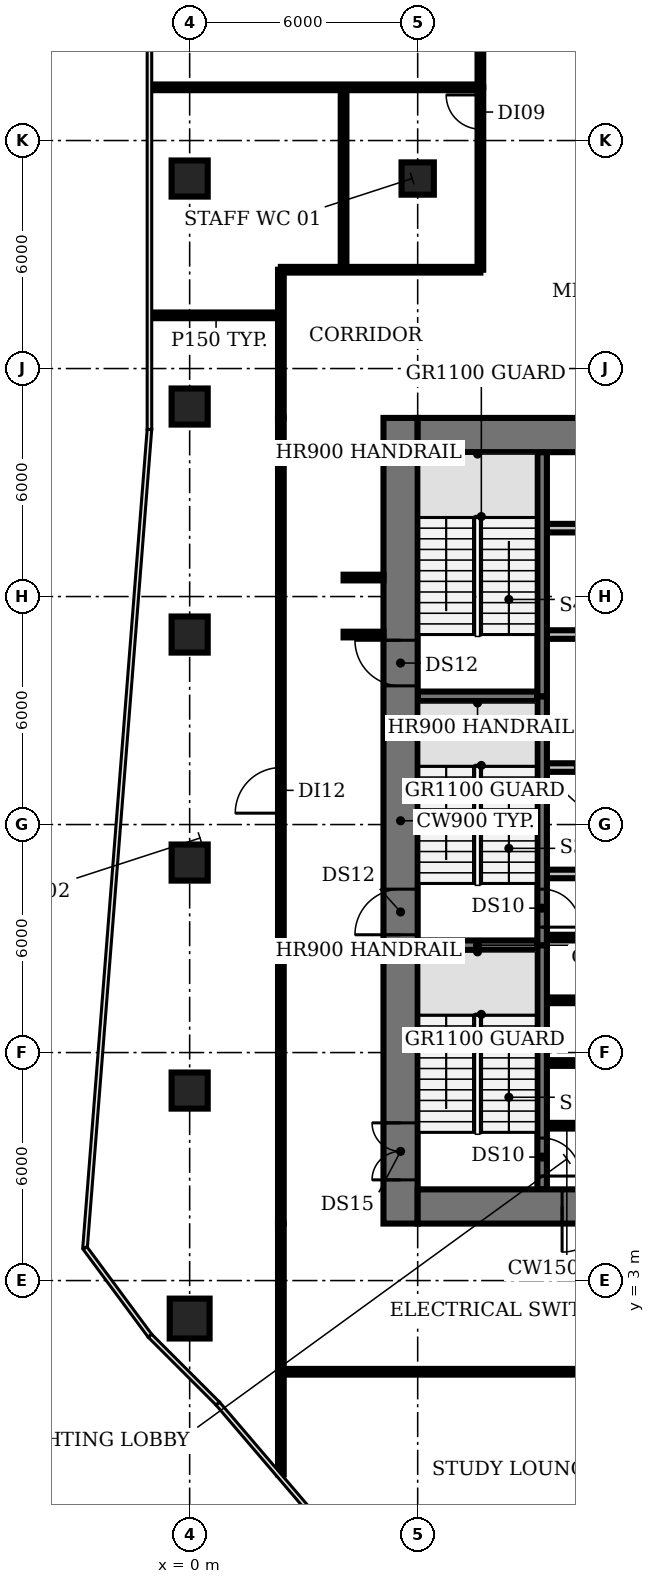
"""IFC4 building model, lengths in metres.
Left out: names, types, materials, properties, quantities, classifications, styles, units other than length and angle.
Written with IfcOpenShell. Run it as: python <this file> out.ifc"""

import sys

from ifc_helpers import new_model, si_unit, direction, frame, frame_2d, origin, origin_2d, place, context, subcontext, project, spatial, rectangle, circle, extrude, element, fill, save


model = new_model("IFC4")
c1 = context("Model", 3, precision=1e-05, world=origin(), true_north=direction((0.0, 1.0)))
c2 = subcontext(c1, "Body", "Model", "MODEL_VIEW")
j1 = project(units=[si_unit("LENGTHUNIT", "METRE"), si_unit("PLANEANGLEUNIT", "RADIAN")], contexts=[c1])
p1 = place(None, origin())
s1 = spatial("IfcSite", under=j1, at=p1, CompositionType="ELEMENT")
p2 = place(p1, origin())
s2 = spatial("IfcBuilding", under=s1, at=p2, CompositionType="ELEMENT")
p3 = place(p2, frame((0.0, 0.0, 33.2)))
s3 = spatial("IfcBuildingStorey", under=s2, at=p3, CompositionType="ELEMENT", Elevation=33.2)
p4 = place(p3, frame((0.0, 2.0, 0.0), z_axis=(0.0, 0.0, 1.0), x_axis=(1.0, 0.0, 0.0)))
e1 = element("IfcColumn", 1, at=p4, inside=s3, PredefinedType="COLUMN", context=c2, shape_type="SweptSolid", body=[
    extrude(circle(Radius=0.525, at=origin_2d()), origin(), (0.0, 0.0, 1.0), 3.85),
])
for number, where, z_axis, x_axis in (
    (2, (0.0, 8.0, 0.0), (0.0, 0.0, 1.0), (1.0, 0.0, 0.0)),
    (3, (0.0, 14.0, 0.0), (0.0, 0.0, 1.0), (1.0, 0.0, 0.0)),
    (4, (0.0, 20.0, 0.0), (0.0, 0.0, 1.0), (1.0, 0.0, 0.0)),
    (5, (0.0, 26.0, 0.0), (0.0, 0.0, 1.0), (1.0, 0.0, 0.0)),
    (6, (0.0, 32.0, 0.0), (0.0, 0.0, 1.0), (1.0, 0.0, 0.0)),
):
    element("IfcColumn", number, at=place(p3, frame(where, z_axis=z_axis, x_axis=x_axis)), inside=s3, PredefinedType="COLUMN", context=c2, shape_type="SweptSolid", body=[
        extrude(rectangle(XDim=0.95, YDim=0.95, at=origin_2d()), origin(), (0.0, 0.0, 1.0), 3.85),
    ])
p5 = place(p3, frame((6.0, 32.0, 0.0), z_axis=(0.0, 0.0, 1.0), x_axis=(1.0, 0.0, 0.0)))
e7 = element("IfcColumn", 7, at=p5, inside=s3, PredefinedType="COLUMN", context=c2, shape_type="SweptSolid", body=[
    extrude(rectangle(XDim=0.85, YDim=0.85, at=origin_2d()), origin(), (0.0, 0.0, 1.0), 3.85),
])
for number, where, z_axis, x_axis in (
    (8, (9.4, 7.075, 0.0), (0.0, 0.0, 1.0), (1.0, 0.0, 0.0)),
    (9, (9.4, 8.725, 0.0), (0.0, 0.0, 1.0), (1.0, 0.0, 0.0)),
    (10, (9.4, 10.375, 0.0), (0.0, 0.0, 1.0), (1.0, 0.0, 0.0)),
):
    element("IfcWall", number, at=place(p3, frame(where, z_axis=z_axis, x_axis=x_axis)), inside=s3, PredefinedType="SHEAR", context=c2, shape_type="SweptSolid", body=[
        extrude(rectangle(XDim=1.05, YDim=0.15, at=frame_2d((0.525, 0.0))), origin(), (0.0, 0.0, 1.0), 3.85),
    ])
p6 = place(p3, frame((6.0, 11.825, 0.0), z_axis=(0.0, 0.0, 1.0), x_axis=(1.0, 0.0, 0.0)))
e11 = element("IfcWall", 11, at=p6, inside=s3, PredefinedType="SHEAR", context=c2, shape_type="SweptSolid", body=[
    extrude(rectangle(XDim=3.15, YDim=0.25, at=frame_2d((1.575, 0.0))), origin(), (0.0, 0.0, 1.0), 3.85),
])
p7 = place(p3, frame((9.4, 12.025, 0.0), z_axis=(0.0, 0.0, 1.0), x_axis=(1.0, 0.0, 0.0)))
e12 = element("IfcWall", 12, at=p7, inside=s3, PredefinedType="SHEAR", context=c2, shape_type="SweptSolid", body=[
    extrude(rectangle(XDim=1.05, YDim=0.15, at=frame_2d((0.525, 0.0))), origin(), (0.0, 0.0, 1.0), 3.85),
])
p8 = place(p3, frame((9.4, 13.7, 0.0), z_axis=(0.0, 0.0, 1.0), x_axis=(1.0, 0.0, 0.0)))
e13 = element("IfcWall", 13, at=p8, inside=s3, PredefinedType="PARTITIONING", context=c2, shape_type="SweptSolid", body=[
    extrude(rectangle(XDim=4.0, YDim=0.225, at=frame_2d((2.0, 0.0))), origin(), (0.0, 0.0, 1.0), 3.85),
])
p9 = place(p3, frame((9.4, 16.5, 0.0), z_axis=(0.0, 0.0, 1.0), x_axis=(1.0, 0.0, 0.0)))
e14 = element("IfcWall", 14, at=p9, inside=s3, PredefinedType="PARTITIONING", context=c2, shape_type="SweptSolid", body=[
    extrude(rectangle(XDim=14.6, YDim=0.225, at=frame_2d((7.3, 0.0))), origin(), (0.0, 0.0, 1.0), 3.85),
])
p10 = place(p9, frame((0.75, 0.0, 0.0)))
e15 = element("IfcOpeningElement", 15, at=p10, cuts=e14, PredefinedType="OPENING", context=c2, shape_type="SweptSolid", body=[
    extrude(rectangle(XDim=1.1, YDim=2.1, at=frame_2d((0.55, 1.05))), frame((0.0, 0.123, 0.0), z_axis=(0.0, -1.0, 0.0), x_axis=(1.0, 0.0, 0.0)), (0.0, 0.0, 1.0), 0.245),
])
p11 = place(p9, frame((3.55, 0.0, 0.0)))
e16 = element("IfcOpeningElement", 16, at=p11, cuts=e14, PredefinedType="OPENING", context=c2, shape_type="SweptSolid", body=[
    extrude(rectangle(XDim=1.1, YDim=2.1, at=frame_2d((0.55, 1.05))), frame((0.0, 0.123, 0.0), z_axis=(0.0, -1.0, 0.0), x_axis=(1.0, 0.0, 0.0)), (0.0, 0.0, 1.0), 0.245),
])
p12 = place(p9, frame((6.35, 0.0, 0.0)))
e17 = element("IfcOpeningElement", 17, at=p12, cuts=e14, PredefinedType="OPENING", context=c2, shape_type="SweptSolid", body=[
    extrude(rectangle(XDim=1.1, YDim=2.1, at=frame_2d((0.55, 1.05))), frame((0.0, 0.123, 0.0), z_axis=(0.0, -1.0, 0.0), x_axis=(1.0, 0.0, 0.0)), (0.0, 0.0, 1.0), 0.245),
])
p13 = place(p9, frame((9.15, 0.0, 0.0)))
e18 = element("IfcOpeningElement", 18, at=p13, cuts=e14, PredefinedType="OPENING", context=c2, shape_type="SweptSolid", body=[
    extrude(rectangle(XDim=1.1, YDim=2.1, at=frame_2d((0.55, 1.05))), frame((0.0, 0.123, 0.0), z_axis=(0.0, -1.0, 0.0), x_axis=(1.0, 0.0, 0.0)), (0.0, 0.0, 1.0), 0.245),
])
p14 = place(p9, frame((11.308, 0.0, 0.0)))
e19 = element("IfcOpeningElement", 19, at=p14, cuts=e14, PredefinedType="OPENING", context=c2, shape_type="SweptSolid", body=[
    extrude(rectangle(XDim=0.9, YDim=2.1, at=frame_2d((0.45, 1.05))), frame((0.0, 0.123, 0.0), z_axis=(0.0, -1.0, 0.0), x_axis=(1.0, 0.0, 0.0)), (0.0, 0.0, 1.0), 0.245),
])
p15 = place(p9, frame((13.083, 0.0, 0.0)))
e20 = element("IfcOpeningElement", 20, at=p15, cuts=e14, PredefinedType="OPENING", context=c2, shape_type="SweptSolid", body=[
    extrude(rectangle(XDim=0.9, YDim=2.1, at=frame_2d((0.45, 1.05))), frame((0.0, 0.123, 0.0), z_axis=(0.0, -1.0, 0.0), x_axis=(1.0, 0.0, 0.0)), (0.0, 0.0, 1.0), 0.245),
])
p16 = place(p3, frame((6.0, 18.375, 0.0), z_axis=(0.0, 0.0, 1.0), x_axis=(1.0, 0.0, 0.0)))
e21 = element("IfcWall", 21, at=p16, inside=s3, PredefinedType="SHEAR", context=c2, shape_type="SweptSolid", body=[
    extrude(rectangle(XDim=3.15, YDim=0.25, at=frame_2d((1.575, 0.0))), origin(), (0.0, 0.0, 1.0), 3.85),
])
p17 = place(p3, frame((24.0, 20.0, 0.0), z_axis=(0.0, 0.0, 1.0), x_axis=(-1.0, 0.0, 0.0)))
e22 = element("IfcWall", 22, at=p17, inside=s3, PredefinedType="PARTITIONING", context=c2, shape_type="SweptSolid", body=[
    extrude(rectangle(XDim=14.6, YDim=0.225, at=frame_2d((7.3, 0.0))), origin(), (0.0, 0.0, 1.0), 3.85),
])
p18 = place(p17, frame((12.9, 0.0, 0.0)))
e23 = element("IfcOpeningElement", 23, at=p18, cuts=e22, PredefinedType="OPENING", context=c2, shape_type="SweptSolid", body=[
    extrude(rectangle(XDim=0.9, YDim=2.1, at=frame_2d((0.45, 1.05))), frame((0.0, 0.123, 0.0), z_axis=(0.0, -1.0, 0.0), x_axis=(1.0, 0.0, 0.0)), (0.0, 0.0, 1.0), 0.245),
])
p19 = place(p17, frame((9.475, 0.0, 0.0)))
e24 = element("IfcOpeningElement", 24, at=p19, cuts=e22, PredefinedType="OPENING", context=c2, shape_type="SweptSolid", body=[
    extrude(rectangle(XDim=1.0, YDim=2.1, at=frame_2d((0.5, 1.05))), frame((0.0, 0.123, 0.0), z_axis=(0.0, -1.0, 0.0), x_axis=(1.0, 0.0, 0.0)), (0.0, 0.0, 1.0), 0.245),
])
p20 = place(p17, frame((6.375, 0.0, 0.0)))
e25 = element("IfcOpeningElement", 25, at=p20, cuts=e22, PredefinedType="OPENING", context=c2, shape_type="SweptSolid", body=[
    extrude(rectangle(XDim=0.9, YDim=2.1, at=frame_2d((0.45, 1.05))), frame((0.0, 0.123, 0.0), z_axis=(0.0, -1.0, 0.0), x_axis=(1.0, 0.0, 0.0)), (0.0, 0.0, 1.0), 0.245),
])
p21 = place(p17, frame((4.175, 0.0, 0.0)))
e26 = element("IfcOpeningElement", 26, at=p21, cuts=e22, PredefinedType="OPENING", context=c2, shape_type="SweptSolid", body=[
    extrude(rectangle(XDim=0.9, YDim=2.1, at=frame_2d((0.45, 1.05))), frame((0.0, 0.123, 0.0), z_axis=(0.0, -1.0, 0.0), x_axis=(1.0, 0.0, 0.0)), (0.0, 0.0, 1.0), 0.245),
])
p22 = place(p17, frame((2.308, 0.0, 0.0)))
e27 = element("IfcOpeningElement", 27, at=p22, cuts=e22, PredefinedType="OPENING", context=c2, shape_type="SweptSolid", body=[
    extrude(rectangle(XDim=0.9, YDim=2.1, at=frame_2d((0.45, 1.05))), frame((0.0, 0.123, 0.0), z_axis=(0.0, -1.0, 0.0), x_axis=(1.0, 0.0, 0.0)), (0.0, 0.0, 1.0), 0.245),
])
p23 = place(p17, frame((0.532, 0.0, 0.0)))
e28 = element("IfcOpeningElement", 28, at=p23, cuts=e22, PredefinedType="OPENING", context=c2, shape_type="SweptSolid", body=[
    extrude(rectangle(XDim=0.9, YDim=2.1, at=frame_2d((0.45, 1.05))), frame((0.0, 0.123, 0.0), z_axis=(0.0, -1.0, 0.0), x_axis=(1.0, 0.0, 0.0)), (0.0, 0.0, 1.0), 0.245),
])
p24 = place(p3, frame((9.4, 22.8, 0.0), z_axis=(0.0, 0.0, 1.0), x_axis=(1.0, 0.0, 0.0)))
e29 = element("IfcWall", 29, at=p24, inside=s3, PredefinedType="PARTITIONING", context=c2, shape_type="SweptSolid", body=[
    extrude(rectangle(XDim=14.6, YDim=0.225, at=frame_2d((7.3, 0.0))), origin(), (0.0, 0.0, 1.0), 3.85),
])
p25 = place(p3, frame((9.275, 11.825, 0.0), z_axis=(0.0, 0.0, 1.0), x_axis=(0.0, -1.0, 0.0)))
e30 = element("IfcWall", 30, at=p25, inside=s3, PredefinedType="SHEAR", context=c2, shape_type="SweptSolid", body=[
    extrude(rectangle(XDim=6.425, YDim=0.25, at=frame_2d((3.212, 0.0))), origin(), (0.0, 0.0, 1.0), 3.85),
])
p26 = place(p25, frame((5.075, 0.0, 0.0)))
e31 = element("IfcOpeningElement", 31, at=p26, cuts=e30, PredefinedType="OPENING", context=c2, shape_type="SweptSolid", body=[
    extrude(rectangle(XDim=1.0, YDim=2.1, at=frame_2d((0.5, 1.05))), frame((0.0, 0.135, 0.0), z_axis=(0.0, -1.0, 0.0), x_axis=(1.0, 0.0, 0.0)), (0.0, 0.0, 1.0), 0.27),
])
p27 = place(p3, frame((9.275, 18.375, 0.0), z_axis=(0.0, 0.0, 1.0), x_axis=(0.0, -1.0, 0.0)))
e32 = element("IfcWall", 32, at=p27, inside=s3, PredefinedType="SHEAR", context=c2, shape_type="SweptSolid", body=[
    extrude(rectangle(XDim=6.55, YDim=0.25, at=frame_2d((3.275, 0.0))), origin(), (0.0, 0.0, 1.0), 3.85),
])
p28 = place(p27, frame((5.075, 0.0, 0.0)))
e33 = element("IfcOpeningElement", 33, at=p28, cuts=e32, PredefinedType="OPENING", context=c2, shape_type="SweptSolid", body=[
    extrude(rectangle(XDim=1.0, YDim=2.1, at=frame_2d((0.5, 1.05))), frame((0.0, 0.135, 0.0), z_axis=(0.0, -1.0, 0.0), x_axis=(1.0, 0.0, 0.0)), (0.0, 0.0, 1.0), 0.27),
])
p29 = place(p3, frame((9.275, 18.375, 0.0), z_axis=(0.0, 0.0, 1.0), x_axis=(0.0, 1.0, 0.0)))
e34 = element("IfcWall", 34, at=p29, inside=s3, PredefinedType="SHEAR", context=c2, shape_type="SweptSolid", body=[
    extrude(rectangle(XDim=6.425, YDim=0.25, at=frame_2d((3.212, 0.0))), origin(), (0.0, 0.0, 1.0), 3.85),
])
p30 = place(p3, frame((5.55, 4.5, 0.0), z_axis=(0.0, 0.0, 1.0), x_axis=(0.0, 1.0, 0.0)))
e35 = element("IfcWall", 35, at=p30, inside=s3, PredefinedType="SHEAR", context=c2, shape_type="SweptSolid", body=[
    extrude(rectangle(XDim=21.2, YDim=0.9, at=frame_2d((10.6, 0.0))), origin(), (0.0, 0.0, 1.0), 3.85),
])
p31 = place(p30, frame((1.15, 0.0, 0.0)))
e36 = element("IfcOpeningElement", 36, at=p31, cuts=e35, PredefinedType="OPENING", context=c2, shape_type="SweptSolid", body=[
    extrude(rectangle(XDim=1.5, YDim=2.1, at=frame_2d((0.75, 1.05))), frame((0.0, 0.46, 0.0), z_axis=(0.0, -1.0, 0.0), x_axis=(1.0, 0.0, 0.0)), (0.0, 0.0, 1.0), 0.92),
])
p32 = place(p30, frame((7.6, 0.0, 0.0)))
e37 = element("IfcOpeningElement", 37, at=p32, cuts=e35, PredefinedType="OPENING", context=c2, shape_type="SweptSolid", body=[
    extrude(rectangle(XDim=1.2, YDim=2.1, at=frame_2d((0.6, 1.05))), frame((0.0, 0.46, 0.0), z_axis=(0.0, -1.0, 0.0), x_axis=(1.0, 0.0, 0.0)), (0.0, 0.0, 1.0), 0.92),
])
p33 = place(p30, frame((14.15, 0.0, 0.0)))
e38 = element("IfcOpeningElement", 38, at=p33, cuts=e35, PredefinedType="OPENING", context=c2, shape_type="SweptSolid", body=[
    extrude(rectangle(XDim=1.2, YDim=2.1, at=frame_2d((0.6, 1.05))), frame((0.0, 0.46, 0.0), z_axis=(0.0, -1.0, 0.0), x_axis=(1.0, 0.0, 0.0)), (0.0, 0.0, 1.0), 0.92),
])
p34 = place(p3, frame((24.0, 4.95, 0.0), z_axis=(0.0, 0.0, 1.0), x_axis=(-1.0, 0.0, 0.0)))
e39 = element("IfcWall", 39, at=p34, inside=s3, PredefinedType="SHEAR", context=c2, shape_type="SweptSolid", body=[
    extrude(rectangle(XDim=18.0, YDim=0.9, at=frame_2d((9.0, 0.0))), origin(), (0.0, 0.0, 1.0), 3.85),
])
p35 = place(p34, frame((13.0, 0.0, 0.0)))
e40 = element("IfcOpeningElement", 40, at=p35, cuts=e39, PredefinedType="OPENING", context=c2, shape_type="SweptSolid", body=[
    extrude(rectangle(XDim=1.2, YDim=2.1, at=frame_2d((0.6, 1.05))), frame((0.0, 0.46, 0.0), z_axis=(0.0, -1.0, 0.0), x_axis=(1.0, 0.0, 0.0)), (0.0, 0.0, 1.0), 0.92),
])
p36 = place(p34, frame((4.9, 0.0, 0.0)))
e41 = element("IfcOpeningElement", 41, at=p36, cuts=e39, PredefinedType="OPENING", context=c2, shape_type="SweptSolid", body=[
    extrude(rectangle(XDim=1.0, YDim=2.1, at=frame_2d((0.5, 1.05))), frame((0.0, 0.46, 0.0), z_axis=(0.0, -1.0, 0.0), x_axis=(1.0, 0.0, 0.0)), (0.0, 0.0, 1.0), 0.92),
])
p37 = place(p3, frame((6.0, 25.25, 0.0), z_axis=(0.0, 0.0, 1.0), x_axis=(1.0, 0.0, 0.0)))
e42 = element("IfcWall", 42, at=p37, inside=s3, PredefinedType="SHEAR", context=c2, shape_type="SweptSolid", body=[
    extrude(rectangle(XDim=18.0, YDim=0.9, at=frame_2d((9.0, 0.0))), origin(), (0.0, 0.0, 1.0), 3.85),
])
p38 = place(p3, frame((-1.01, 28.4, 0.0), z_axis=(0.0, 0.0, 1.0), x_axis=(1.0, 0.0, 0.0)))
e43 = element("IfcWall", 43, at=p38, inside=s3, PredefinedType="PARTITIONING", context=c2, shape_type="SweptSolid", body=[
    extrude(rectangle(XDim=3.41, YDim=0.15, at=frame_2d((1.705, 0.0))), origin(), (0.0, 0.0, 1.0), 2.83),
])
p39 = place(p3, frame((-1.01, 34.4, 0.0), z_axis=(0.0, 0.0, 1.0), x_axis=(1.0, 0.0, 0.0)))
e44 = element("IfcWall", 44, at=p39, inside=s3, PredefinedType="PARTITIONING", context=c2, shape_type="SweptSolid", body=[
    extrude(rectangle(XDim=8.66, YDim=0.15, at=frame_2d((4.33, 0.0))), origin(), (0.0, 0.0, 1.0), 2.83),
])
p40 = place(p3, frame((2.4, -2.1, 0.0), z_axis=(0.0, 0.0, 1.0), x_axis=(0.0, 1.0, 0.0)))
e45 = element("IfcWall", 45, at=p40, inside=s3, PredefinedType="PARTITIONING", context=c2, shape_type="SweptSolid", body=[
    extrude(rectangle(XDim=2.7, YDim=0.15, at=frame_2d((1.35, 0.0))), origin(), (0.0, 0.0, 1.0), 2.83),
])
p41 = place(p3, frame((2.4, 0.6, 0.0), z_axis=(0.0, 0.0, 1.0), x_axis=(0.0, 1.0, 0.0)))
e46 = element("IfcWall", 46, at=p41, inside=s3, PredefinedType="PARTITIONING", context=c2, shape_type="SweptSolid", body=[
    extrude(rectangle(XDim=3.9, YDim=0.15, at=frame_2d((1.95, 0.0))), origin(), (0.0, 0.0, 1.0), 2.83),
])
p42 = place(p3, frame((2.4, 4.5, 0.0), z_axis=(0.0, 0.0, 1.0), x_axis=(0.0, 1.0, 0.0)))
e47 = element("IfcWall", 47, at=p42, inside=s3, PredefinedType="PARTITIONING", context=c2, shape_type="SweptSolid", body=[
    extrude(rectangle(XDim=21.2, YDim=0.15, at=frame_2d((10.6, 0.0))), origin(), (0.0, 0.0, 1.0), 2.83),
])
p43 = place(p42, frame((10.8, 0.0, 0.0)))
e48 = element("IfcOpeningElement", 48, at=p43, cuts=e47, PredefinedType="OPENING", context=c2, shape_type="SweptSolid", body=[
    extrude(rectangle(XDim=1.2, YDim=2.1, at=frame_2d((0.6, 1.05))), frame((0.0, 0.085, 0.0), z_axis=(0.0, -1.0, 0.0), x_axis=(1.0, 0.0, 0.0)), (0.0, 0.0, 1.0), 0.17),
])
p44 = place(p3, frame((2.4, 25.7, 0.0), z_axis=(0.0, 0.0, 1.0), x_axis=(0.0, 1.0, 0.0)))
e49 = element("IfcWall", 49, at=p44, inside=s3, PredefinedType="PARTITIONING", context=c2, shape_type="SweptSolid", body=[
    extrude(rectangle(XDim=3.9, YDim=0.15, at=frame_2d((1.95, 0.0))), origin(), (0.0, 0.0, 1.0), 2.83),
])
p45 = place(p3, frame((2.4, 29.6, 0.0), z_axis=(0.0, 0.0, 1.0), x_axis=(1.0, 0.0, 0.0)))
e50 = element("IfcWall", 50, at=p45, inside=s3, PredefinedType="PARTITIONING", context=c2, shape_type="SweptSolid", body=[
    extrude(rectangle(XDim=5.25, YDim=0.15, at=frame_2d((2.625, 0.0))), origin(), (0.0, 0.0, 1.0), 2.83),
])
for number, where, z_axis, x_axis in (
    (51, (4.05, 20.0, 0.0), (0.0, 0.0, 1.0), (1.0, 0.0, 0.0)),
    (52, (4.05, 21.5, 0.0), (0.0, 0.0, 1.0), (1.0, 0.0, 0.0)),
):
    element("IfcWall", number, at=place(p3, frame(where, z_axis=z_axis, x_axis=x_axis)), inside=s3, PredefinedType="PARTITIONING", context=c2, shape_type="SweptSolid", body=[
        extrude(rectangle(XDim=1.05, YDim=0.15, at=frame_2d((0.525, 0.0))), origin(), (0.0, 0.0, 1.0), 2.83),
    ])
p46 = place(p3, frame((4.05, 29.6, 0.0), z_axis=(0.0, 0.0, 1.0), x_axis=(0.0, 1.0, 0.0)))
e53 = element("IfcWall", 53, at=p46, inside=s3, PredefinedType="PARTITIONING", context=c2, shape_type="SweptSolid", body=[
    extrude(rectangle(XDim=4.8, YDim=0.15, at=frame_2d((2.4, 0.0))), origin(), (0.0, 0.0, 1.0), 2.83),
])
p47 = place(p3, frame((7.65, 29.6, 0.0), z_axis=(0.0, 0.0, 1.0), x_axis=(0.0, 1.0, 0.0)))
e54 = element("IfcWall", 54, at=p47, inside=s3, PredefinedType="PARTITIONING", context=c2, shape_type="SweptSolid", body=[
    extrude(rectangle(XDim=4.8, YDim=0.15, at=frame_2d((2.4, 0.0))), origin(), (0.0, 0.0, 1.0), 2.83),
])
p48 = place(p47, frame((3.7, 0.0, 0.0)))
e55 = element("IfcOpeningElement", 55, at=p48, cuts=e54, PredefinedType="OPENING", context=c2, shape_type="SweptSolid", body=[
    extrude(rectangle(XDim=0.9, YDim=2.1, at=frame_2d((0.45, 1.05))), frame((0.0, 0.085, 0.0), z_axis=(0.0, -1.0, 0.0), x_axis=(1.0, 0.0, 0.0)), (0.0, 0.0, 1.0), 0.17),
])
p49 = place(p3, frame((7.65, 34.4, 0.0), z_axis=(0.0, 0.0, 1.0), x_axis=(0.0, 1.0, 0.0)))
e56 = element("IfcWall", 56, at=p49, inside=s3, PredefinedType="PARTITIONING", context=c2, shape_type="SweptSolid", body=[
    extrude(rectangle(XDim=4.6, YDim=0.15, at=frame_2d((2.3, 0.0))), origin(), (0.0, 0.0, 1.0), 2.83),
])
p50 = place(p49, frame((1.9, 0.0, 0.0)))
e57 = element("IfcOpeningElement", 57, at=p50, cuts=e56, PredefinedType="OPENING", context=c2, shape_type="SweptSolid", body=[
    extrude(rectangle(XDim=1.0, YDim=2.1, at=frame_2d((0.5, 1.05))), frame((0.0, 0.085, 0.0), z_axis=(0.0, -1.0, 0.0), x_axis=(1.0, 0.0, 0.0)), (0.0, 0.0, 1.0), 0.17),
])
p51 = place(p3, frame((27.6, 0.6, 0.0), z_axis=(0.0, 0.0, 1.0), x_axis=(-1.0, 0.0, 0.0)))
e58 = element("IfcWall", 58, at=p51, inside=s3, PredefinedType="PARTITIONING", context=c2, shape_type="SweptSolid", body=[
    extrude(rectangle(XDim=25.2, YDim=0.15, at=frame_2d((12.6, 0.0))), origin(), (0.0, 0.0, 1.0), 2.83),
])
p52 = place(p51, frame((12.1, 0.0, 0.0)))
e59 = element("IfcOpeningElement", 59, at=p52, cuts=e58, PredefinedType="OPENING", context=c2, shape_type="SweptSolid", body=[
    extrude(rectangle(XDim=1.2, YDim=2.1, at=frame_2d((0.6, 1.05))), frame((0.0, 0.085, 0.0), z_axis=(0.0, -1.0, 0.0), x_axis=(1.0, 0.0, 0.0)), (0.0, 0.0, 1.0), 0.17),
])
p53 = place(p26, origin())
e60 = element("IfcDoor", 60, at=p53, inside=s3, OperationType="SINGLE_SWING_RIGHT", PredefinedType="DOOR", context=c2, shape_type="SweptSolid", body=[
    extrude(rectangle(XDim=1.0, YDim=2.1, at=frame_2d((0.5, 1.05))), frame((0.0, 0.025, 0.0), z_axis=(0.0, -1.0, 0.0), x_axis=(1.0, 0.0, 0.0)), (0.0, 0.0, 1.0), 0.05),
])
fill(e31, e60)
p54 = place(p28, origin())
e61 = element("IfcDoor", 61, at=p54, inside=s3, OperationType="SINGLE_SWING_RIGHT", PredefinedType="DOOR", context=c2, shape_type="SweptSolid", body=[
    extrude(rectangle(XDim=1.0, YDim=2.1, at=frame_2d((0.5, 1.05))), frame((0.0, 0.025, 0.0), z_axis=(0.0, -1.0, 0.0), x_axis=(1.0, 0.0, 0.0)), (0.0, 0.0, 1.0), 0.05),
])
fill(e33, e61)
p55 = place(p31, origin())
e62 = element("IfcDoor", 62, at=p55, inside=s3, OperationType="DOUBLE_DOOR_SINGLE_SWING", PredefinedType="DOOR", context=c2, shape_type="SweptSolid", body=[
    extrude(rectangle(XDim=1.5, YDim=2.1, at=frame_2d((0.75, 1.05))), frame((0.0, 0.025, 0.0), z_axis=(0.0, -1.0, 0.0), x_axis=(1.0, 0.0, 0.0)), (0.0, 0.0, 1.0), 0.05),
])
fill(e36, e62)
p56 = place(p32, origin())
e63 = element("IfcDoor", 63, at=p56, inside=s3, OperationType="SINGLE_SWING_LEFT", PredefinedType="DOOR", context=c2, shape_type="SweptSolid", body=[
    extrude(rectangle(XDim=1.2, YDim=2.1, at=frame_2d((0.6, 1.05))), frame((0.0, 0.025, 0.0), z_axis=(0.0, -1.0, 0.0), x_axis=(1.0, 0.0, 0.0)), (0.0, 0.0, 1.0), 0.05),
])
fill(e37, e63)
p57 = place(p33, origin())
e64 = element("IfcDoor", 64, at=p57, inside=s3, OperationType="SINGLE_SWING_RIGHT", PredefinedType="DOOR", context=c2, shape_type="SweptSolid", body=[
    extrude(rectangle(XDim=1.2, YDim=2.1, at=frame_2d((0.6, 1.05))), frame((0.0, 0.025, 0.0), z_axis=(0.0, -1.0, 0.0), x_axis=(1.0, 0.0, 0.0)), (0.0, 0.0, 1.0), 0.05),
])
fill(e38, e64)
p58 = place(p35, origin())
e65 = element("IfcDoor", 65, at=p58, inside=s3, OperationType="SINGLE_SWING_RIGHT", PredefinedType="DOOR", context=c2, shape_type="SweptSolid", body=[
    extrude(rectangle(XDim=1.2, YDim=2.1, at=frame_2d((0.6, 1.05))), frame((0.0, 0.025, 0.0), z_axis=(0.0, -1.0, 0.0), x_axis=(1.0, 0.0, 0.0)), (0.0, 0.0, 1.0), 0.05),
])
fill(e40, e65)
p59 = place(p43, origin())
e66 = element("IfcDoor", 66, at=p59, inside=s3, OperationType="SINGLE_SWING_LEFT", PredefinedType="DOOR", context=c2, shape_type="SweptSolid", body=[
    extrude(rectangle(XDim=1.2, YDim=2.1, at=frame_2d((0.6, 1.05))), frame((0.0, 0.025, 0.0), z_axis=(0.0, -1.0, 0.0), x_axis=(1.0, 0.0, 0.0)), (0.0, 0.0, 1.0), 0.05),
])
fill(e48, e66)
p60 = place(p48, origin())
e67 = element("IfcDoor", 67, at=p60, inside=s3, OperationType="SINGLE_SWING_RIGHT", PredefinedType="DOOR", context=c2, shape_type="SweptSolid", body=[
    extrude(rectangle(XDim=0.9, YDim=2.1, at=frame_2d((0.45, 1.05))), frame((0.0, 0.025, 0.0), z_axis=(0.0, -1.0, 0.0), x_axis=(1.0, 0.0, 0.0)), (0.0, 0.0, 1.0), 0.05),
])
fill(e55, e67)
save(model, sys.argv[1])
